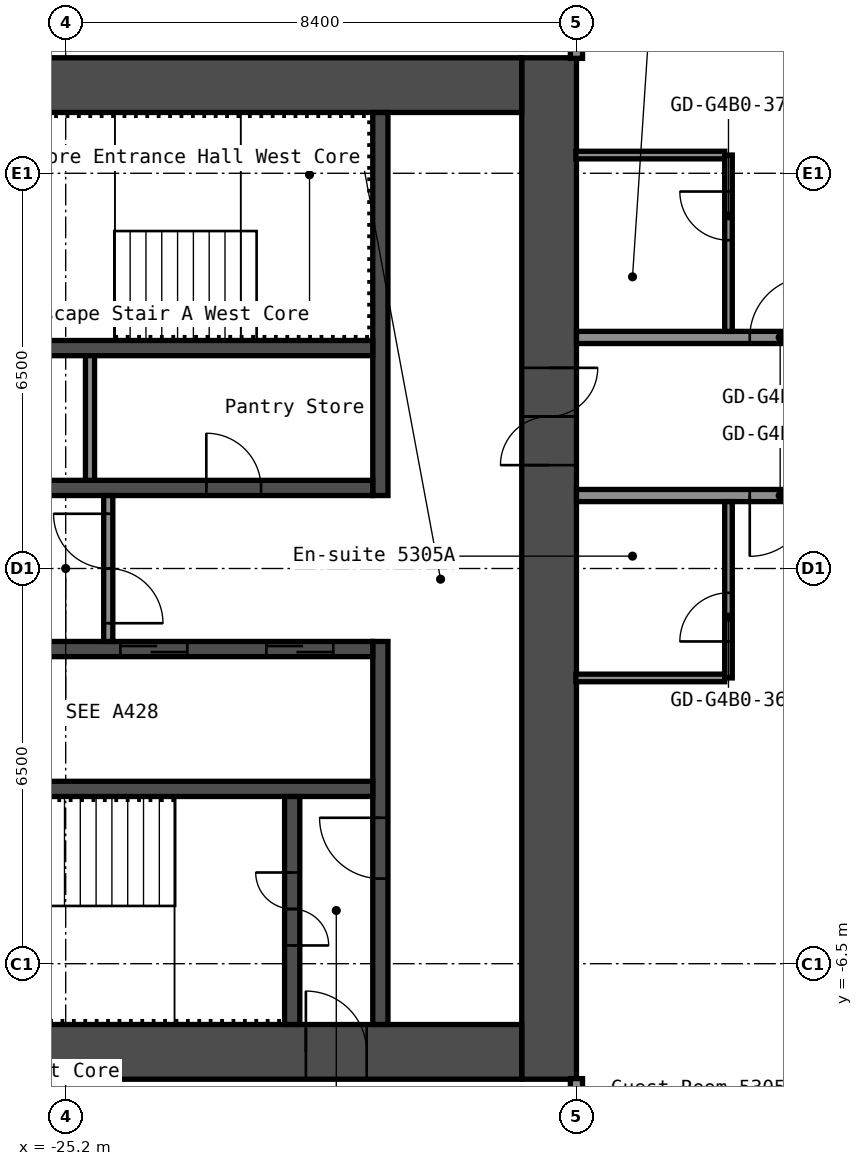
"""IFC4 building model, lengths in metres.
Left out: names, types, materials, properties, quantities, classifications, styles, units other than length and angle.
Written with IfcOpenShell. Run it as: python <this file> out.ifc"""

import sys

from ifc_helpers import new_model, si_unit, direction, frame, frame_2d, origin, place, context, subcontext, project, spatial, rectangle, extrude, element, fill, save


model = new_model("IFC4")
c1 = context("Model", 3, precision=1e-05, world=origin(), true_north=direction((0.0, 1.0)))
c2 = subcontext(c1, "Body", "Model", "MODEL_VIEW")
j1 = project(units=[si_unit("LENGTHUNIT", "METRE"), si_unit("PLANEANGLEUNIT", "RADIAN")], contexts=[c1])
p1 = place(None, origin())
s1 = spatial("IfcSite", under=j1, at=p1, CompositionType="ELEMENT")
p2 = place(p1, origin())
s2 = spatial("IfcBuilding", under=s1, at=p2, CompositionType="ELEMENT")
p3 = place(p2, frame((0.0, 0.0, 189.8)))
s3 = spatial("IfcBuildingStorey", under=s2, at=p3, CompositionType="ELEMENT", Elevation=189.8)
p4 = place(p3, frame((-17.25, -8.4, 0.0), z_axis=(0.0, 0.0, 1.0), x_axis=(0.0, 1.0, 0.0)))
e1 = element("IfcWall", 1, at=p4, inside=s3, PredefinedType="SHEAR", context=c2, shape_type="SweptSolid", body=[
    extrude(rectangle(XDim=16.8, YDim=0.9, at=frame_2d((8.4, 0.0))), origin(), (0.0, 0.0, 1.0), 2.75),
])
p5 = place(p4, frame((10.1, 0.0, 0.0)))
e2 = element("IfcOpeningElement", 2, at=p5, cuts=e1, PredefinedType="OPENING", context=c2, shape_type="SweptSolid", body=[
    extrude(rectangle(XDim=1.6, YDim=2.1, at=frame_2d((0.8, 1.05))), frame((0.0, 0.46, 0.0), z_axis=(0.0, -1.0, 0.0), x_axis=(1.0, 0.0, 0.0)), (0.0, 0.0, 1.0), 0.92),
])
p6 = place(p3, frame((-32.7, 7.95, 0.0), z_axis=(0.0, 0.0, 1.0), x_axis=(1.0, 0.0, 0.0)))
e3 = element("IfcWall", 3, at=p6, inside=s3, PredefinedType="SHEAR", context=c2, shape_type="SweptSolid", body=[
    extrude(rectangle(XDim=15.0, YDim=0.9, at=frame_2d((7.5, 0.0))), origin(), (0.0, 0.0, 1.0), 2.75),
])
p7 = place(p6, frame((3.4, 0.0, 0.0)))
e4 = element("IfcOpeningElement", 4, at=p7, cuts=e3, PredefinedType="OPENING", context=c2, shape_type="SweptSolid", body=[
    extrude(rectangle(XDim=1.2, YDim=2.1, at=frame_2d((0.6, 1.05))), frame((0.0, 0.46, 0.0), z_axis=(0.0, -1.0, 0.0), x_axis=(1.0, 0.0, 0.0)), (0.0, 0.0, 1.0), 0.92),
])
p8 = place(p6, frame((0.75, 0.0, 0.0)))
e5 = element("IfcOpeningElement", 5, at=p8, cuts=e3, PredefinedType="OPENING", context=c2, shape_type="SweptSolid", body=[
    extrude(rectangle(XDim=0.9, YDim=2.1, at=frame_2d((0.45, 1.05))), frame((0.0, 0.46, 0.0), z_axis=(0.0, -1.0, 0.0), x_axis=(1.0, 0.0, 0.0)), (0.0, 0.0, 1.0), 0.92),
])
p9 = place(p3, frame((-32.7, -7.95, 0.0), z_axis=(0.0, 0.0, 1.0), x_axis=(1.0, 0.0, 0.0)))
e6 = element("IfcWall", 6, at=p9, inside=s3, PredefinedType="SHEAR", context=c2, shape_type="SweptSolid", body=[
    extrude(rectangle(XDim=15.0, YDim=0.9, at=frame_2d((7.5, 0.0))), origin(), (0.0, 0.0, 1.0), 2.75),
])
p10 = place(p9, frame((11.45, 0.0, 0.0)))
e7 = element("IfcOpeningElement", 7, at=p10, cuts=e6, PredefinedType="OPENING", context=c2, shape_type="SweptSolid", body=[
    extrude(rectangle(XDim=1.0, YDim=2.1, at=frame_2d((0.5, 1.05))), frame((0.0, 0.46, 0.0), z_axis=(0.0, -1.0, 0.0), x_axis=(1.0, 0.0, 0.0)), (0.0, 0.0, 1.0), 0.92),
])
p11 = place(p3, frame((-20.025, 1.2, 0.0), z_axis=(0.0, 0.0, 1.0), x_axis=(0.0, 1.0, 0.0)))
e8 = element("IfcWall", 8, at=p11, inside=s3, PredefinedType="SHEAR", context=c2, shape_type="SweptSolid", body=[
    extrude(rectangle(XDim=6.3, YDim=0.25, at=frame_2d((3.15, 0.0))), origin(), (0.0, 0.0, 1.0), 2.75),
])
p12 = place(p3, frame((-20.025, -7.5, 0.0), z_axis=(0.0, 0.0, 1.0), x_axis=(0.0, 1.0, 0.0)))
e9 = element("IfcWall", 9, at=p12, inside=s3, PredefinedType="SHEAR", context=c2, shape_type="SweptSolid", body=[
    extrude(rectangle(XDim=6.3, YDim=0.25, at=frame_2d((3.15, 0.0))), origin(), (0.0, 0.0, 1.0), 2.75),
])
p13 = place(p12, frame((2.4, 0.0, 0.0)))
e10 = element("IfcOpeningElement", 10, at=p13, cuts=e9, PredefinedType="OPENING", context=c2, shape_type="SweptSolid", body=[
    extrude(rectangle(XDim=1.0, YDim=2.1, at=frame_2d((0.5, 1.05))), frame((0.0, 0.135, 0.0), z_axis=(0.0, -1.0, 0.0), x_axis=(1.0, 0.0, 0.0)), (0.0, 0.0, 1.0), 0.27),
])
p14 = place(p3, frame((-27.65, 1.325, 0.0), z_axis=(0.0, 0.0, 1.0), x_axis=(1.0, 0.0, 0.0)))
e11 = element("IfcWall", 11, at=p14, inside=s3, PredefinedType="SHEAR", context=c2, shape_type="SweptSolid", body=[
    extrude(rectangle(XDim=7.5, YDim=0.25, at=frame_2d((3.75, 0.0))), origin(), (0.0, 0.0, 1.0), 2.75),
])
p15 = place(p14, frame((4.762, 0.0, 0.0)))
e12 = element("IfcOpeningElement", 12, at=p15, cuts=e11, PredefinedType="OPENING", context=c2, shape_type="SweptSolid", body=[
    extrude(rectangle(XDim=0.9, YDim=2.1, at=frame_2d((0.45, 1.05))), frame((0.0, 0.135, 0.0), z_axis=(0.0, -1.0, 0.0), x_axis=(1.0, 0.0, 0.0)), (0.0, 0.0, 1.0), 0.27),
])
p16 = place(p14, frame((1.062, 0.0, 0.0)))
e13 = element("IfcOpeningElement", 13, at=p16, cuts=e11, PredefinedType="OPENING", context=c2, shape_type="SweptSolid", body=[
    extrude(rectangle(XDim=0.9, YDim=2.1, at=frame_2d((0.45, 1.05))), frame((0.0, 0.135, 0.0), z_axis=(0.0, -1.0, 0.0), x_axis=(1.0, 0.0, 0.0)), (0.0, 0.0, 1.0), 0.27),
])
p17 = place(p3, frame((-27.65, 3.625, 0.0), z_axis=(0.0, 0.0, 1.0), x_axis=(1.0, 0.0, 0.0)))
e14 = element("IfcWall", 14, at=p17, inside=s3, PredefinedType="SHEAR", context=c2, shape_type="SweptSolid", body=[
    extrude(rectangle(XDim=7.5, YDim=0.25, at=frame_2d((3.75, 0.0))), origin(), (0.0, 0.0, 1.0), 2.75),
])
p18 = place(p3, frame((-27.65, -1.325, 0.0), z_axis=(0.0, 0.0, 1.0), x_axis=(1.0, 0.0, 0.0)))
e15 = element("IfcWall", 15, at=p18, inside=s3, PredefinedType="SHEAR", context=c2, shape_type="SweptSolid", body=[
    extrude(rectangle(XDim=7.5, YDim=0.25, at=frame_2d((3.75, 0.0))), origin(), (0.0, 0.0, 1.0), 2.75),
])
p19 = place(p18, frame((5.75, 0.0, 0.0)))
e16 = element("IfcOpeningElement", 16, at=p19, cuts=e15, PredefinedType="OPENING", context=c2, shape_type="SweptSolid", body=[
    extrude(rectangle(XDim=1.1, YDim=2.1, at=frame_2d((0.55, 1.05))), frame((0.0, 0.135, 0.0), z_axis=(0.0, -1.0, 0.0), x_axis=(1.0, 0.0, 0.0)), (0.0, 0.0, 1.0), 0.27),
])
p20 = place(p18, frame((3.35, 0.0, 0.0)))
e17 = element("IfcOpeningElement", 17, at=p20, cuts=e15, PredefinedType="OPENING", context=c2, shape_type="SweptSolid", body=[
    extrude(rectangle(XDim=1.1, YDim=2.1, at=frame_2d((0.55, 1.05))), frame((0.0, 0.135, 0.0), z_axis=(0.0, -1.0, 0.0), x_axis=(1.0, 0.0, 0.0)), (0.0, 0.0, 1.0), 0.27),
])
p21 = place(p18, frame((0.95, 0.0, 0.0)))
e18 = element("IfcOpeningElement", 18, at=p21, cuts=e15, PredefinedType="OPENING", context=c2, shape_type="SweptSolid", body=[
    extrude(rectangle(XDim=1.1, YDim=2.1, at=frame_2d((0.55, 1.05))), frame((0.0, 0.135, 0.0), z_axis=(0.0, -1.0, 0.0), x_axis=(1.0, 0.0, 0.0)), (0.0, 0.0, 1.0), 0.27),
])
p22 = place(p3, frame((-27.65, -3.625, 0.0), z_axis=(0.0, 0.0, 1.0), x_axis=(1.0, 0.0, 0.0)))
e19 = element("IfcWall", 19, at=p22, inside=s3, PredefinedType="SHEAR", context=c2, shape_type="SweptSolid", body=[
    extrude(rectangle(XDim=7.5, YDim=0.25, at=frame_2d((3.75, 0.0))), origin(), (0.0, 0.0, 1.0), 2.75),
])
p23 = place(p3, frame((-21.475, -7.5, 0.0), z_axis=(0.0, 0.0, 1.0), x_axis=(0.0, 1.0, 0.0)))
e20 = element("IfcWall", 20, at=p23, inside=s3, PredefinedType="SHEAR", context=c2, shape_type="SweptSolid", body=[
    extrude(rectangle(XDim=3.75, YDim=0.25, at=frame_2d((1.875, 0.0))), origin(), (0.0, 0.0, 1.0), 2.75),
])
p24 = place(p23, frame((1.3, 0.0, 0.0)))
e21 = element("IfcOpeningElement", 21, at=p24, cuts=e20, PredefinedType="OPENING", context=c2, shape_type="SweptSolid", body=[
    extrude(rectangle(XDim=1.2, YDim=2.1, at=frame_2d((0.6, 1.05))), frame((0.0, 0.135, 0.0), z_axis=(0.0, -1.0, 0.0), x_axis=(1.0, 0.0, 0.0)), (0.0, 0.0, 1.0), 0.27),
])
p25 = place(p3, frame((-24.5, -1.2, 0.0), z_axis=(0.0, 0.0, 1.0), x_axis=(0.0, 1.0, 0.0)))
e22 = element("IfcWall", 22, at=p25, inside=s3, PredefinedType="PARTITIONING", context=c2, shape_type="SweptSolid", body=[
    extrude(rectangle(XDim=2.4, YDim=0.15, at=frame_2d((1.2, 0.0))), origin(), (0.0, 0.0, 1.0), 2.75),
])
p26 = place(p25, frame((0.3, 0.0, 0.0)))
e23 = element("IfcOpeningElement", 23, at=p26, cuts=e22, PredefinedType="OPENING", context=c2, shape_type="SweptSolid", body=[
    extrude(rectangle(XDim=1.8, YDim=2.1, at=frame_2d((0.9, 1.05))), frame((0.0, 0.085, 0.0), z_axis=(0.0, -1.0, 0.0), x_axis=(1.0, 0.0, 0.0)), (0.0, 0.0, 1.0), 0.17),
])
p27 = place(p3, frame((-24.8, 1.45, 0.0), z_axis=(0.0, 0.0, 1.0), x_axis=(0.0, 1.0, 0.0)))
e24 = element("IfcWall", 24, at=p27, inside=s3, PredefinedType="PARTITIONING", context=c2, shape_type="SweptSolid", body=[
    extrude(rectangle(XDim=2.05, YDim=0.15, at=frame_2d((1.025, 0.0))), origin(), (0.0, 0.0, 1.0), 2.75),
])
p28 = place(p3, frame((-16.81, -1.8, 0.0), z_axis=(0.0, 0.0, 1.0), x_axis=(1.0, 0.0, 0.0)))
e25 = element("IfcWall", 25, at=p28, inside=s3, PredefinedType="PARTITIONING", context=c2, shape_type="SweptSolid", body=[
    extrude(rectangle(XDim=2.448, YDim=0.125, at=frame_2d((1.224, 0.0))), origin(), (0.0, 0.0, 1.0), 2.75),
])
p29 = place(p3, frame((-16.8, 1.2, 0.0), z_axis=(0.0, 0.0, 1.0), x_axis=(1.0, 0.0, 0.0)))
e26 = element("IfcWall", 26, at=p29, inside=s3, PredefinedType="PARTITIONING", context=c2, shape_type="SweptSolid", body=[
    extrude(rectangle(XDim=33.6, YDim=0.2, at=frame_2d((16.8, 0.0))), origin(), (0.0, 0.0, 1.0), 2.75),
])
p30 = place(p29, frame((2.85, 0.0, 0.0)))
e27 = element("IfcOpeningElement", 27, at=p30, cuts=e26, PredefinedType="OPENING", context=c2, shape_type="SweptSolid", body=[
    extrude(rectangle(XDim=1.0, YDim=2.1, at=frame_2d((0.5, 1.05))), frame((0.0, 0.11, 0.0), z_axis=(0.0, -1.0, 0.0), x_axis=(1.0, 0.0, 0.0)), (0.0, 0.0, 1.0), 0.22),
])
p31 = place(p29, frame((4.55, 0.0, 0.0)))
e28 = element("IfcOpeningElement", 28, at=p31, cuts=e26, PredefinedType="OPENING", context=c2, shape_type="SweptSolid", body=[
    extrude(rectangle(XDim=1.0, YDim=2.1, at=frame_2d((0.5, 1.05))), frame((0.0, 0.11, 0.0), z_axis=(0.0, -1.0, 0.0), x_axis=(1.0, 0.0, 0.0)), (0.0, 0.0, 1.0), 0.22),
])
p32 = place(p29, frame((11.25, 0.0, 0.0)))
e29 = element("IfcOpeningElement", 29, at=p32, cuts=e26, PredefinedType="OPENING", context=c2, shape_type="SweptSolid", body=[
    extrude(rectangle(XDim=1.0, YDim=2.1, at=frame_2d((0.5, 1.05))), frame((0.0, 0.11, 0.0), z_axis=(0.0, -1.0, 0.0), x_axis=(1.0, 0.0, 0.0)), (0.0, 0.0, 1.0), 0.22),
])
p33 = place(p29, frame((12.95, 0.0, 0.0)))
e30 = element("IfcOpeningElement", 30, at=p33, cuts=e26, PredefinedType="OPENING", context=c2, shape_type="SweptSolid", body=[
    extrude(rectangle(XDim=1.0, YDim=2.1, at=frame_2d((0.5, 1.05))), frame((0.0, 0.11, 0.0), z_axis=(0.0, -1.0, 0.0), x_axis=(1.0, 0.0, 0.0)), (0.0, 0.0, 1.0), 0.22),
])
p34 = place(p29, frame((18.62, 0.0, 0.0)))
e31 = element("IfcOpeningElement", 31, at=p34, cuts=e26, PredefinedType="OPENING", context=c2, shape_type="SweptSolid", body=[
    extrude(rectangle(XDim=0.9, YDim=2.1, at=frame_2d((0.45, 1.05))), frame((0.0, 0.11, 0.0), z_axis=(0.0, -1.0, 0.0), x_axis=(1.0, 0.0, 0.0)), (0.0, 0.0, 1.0), 0.22),
])
p35 = place(p29, frame((22.82, 0.0, 0.0)))
e32 = element("IfcOpeningElement", 32, at=p35, cuts=e26, PredefinedType="OPENING", context=c2, shape_type="SweptSolid", body=[
    extrude(rectangle(XDim=0.9, YDim=2.1, at=frame_2d((0.45, 1.05))), frame((0.0, 0.11, 0.0), z_axis=(0.0, -1.0, 0.0), x_axis=(1.0, 0.0, 0.0)), (0.0, 0.0, 1.0), 0.22),
])
p36 = place(p29, frame((28.05, 0.0, 0.0)))
e33 = element("IfcOpeningElement", 33, at=p36, cuts=e26, PredefinedType="OPENING", context=c2, shape_type="SweptSolid", body=[
    extrude(rectangle(XDim=1.0, YDim=2.1, at=frame_2d((0.5, 1.05))), frame((0.0, 0.11, 0.0), z_axis=(0.0, -1.0, 0.0), x_axis=(1.0, 0.0, 0.0)), (0.0, 0.0, 1.0), 0.22),
])
p37 = place(p29, frame((29.75, 0.0, 0.0)))
e34 = element("IfcOpeningElement", 34, at=p37, cuts=e26, PredefinedType="OPENING", context=c2, shape_type="SweptSolid", body=[
    extrude(rectangle(XDim=1.0, YDim=2.1, at=frame_2d((0.5, 1.05))), frame((0.0, 0.11, 0.0), z_axis=(0.0, -1.0, 0.0), x_axis=(1.0, 0.0, 0.0)), (0.0, 0.0, 1.0), 0.22),
])
p38 = place(p3, frame((-16.8, 3.8, 0.0), z_axis=(0.0, 0.0, 1.0), x_axis=(1.0, 0.0, 0.0)))
e35 = element("IfcWall", 35, at=p38, inside=s3, PredefinedType="PARTITIONING", context=c2, shape_type="SweptSolid", body=[
    extrude(rectangle(XDim=33.6, YDim=0.2, at=frame_2d((16.8, 0.0))), origin(), (0.0, 0.0, 1.0), 2.75),
])
p39 = place(p38, frame((2.85, 0.0, 0.0)))
e36 = element("IfcOpeningElement", 36, at=p39, cuts=e35, PredefinedType="OPENING", context=c2, shape_type="SweptSolid", body=[
    extrude(rectangle(XDim=1.0, YDim=2.1, at=frame_2d((0.5, 1.05))), frame((0.0, 0.11, 0.0), z_axis=(0.0, -1.0, 0.0), x_axis=(1.0, 0.0, 0.0)), (0.0, 0.0, 1.0), 0.22),
])
p40 = place(p38, frame((4.55, 0.0, 0.0)))
e37 = element("IfcOpeningElement", 37, at=p40, cuts=e35, PredefinedType="OPENING", context=c2, shape_type="SweptSolid", body=[
    extrude(rectangle(XDim=1.0, YDim=2.1, at=frame_2d((0.5, 1.05))), frame((0.0, 0.11, 0.0), z_axis=(0.0, -1.0, 0.0), x_axis=(1.0, 0.0, 0.0)), (0.0, 0.0, 1.0), 0.22),
])
p41 = place(p38, frame((12.1, 0.0, 0.0)))
e38 = element("IfcOpeningElement", 38, at=p41, cuts=e35, PredefinedType="OPENING", context=c2, shape_type="SweptSolid", body=[
    extrude(rectangle(XDim=1.0, YDim=2.1, at=frame_2d((0.5, 1.05))), frame((0.0, 0.11, 0.0), z_axis=(0.0, -1.0, 0.0), x_axis=(1.0, 0.0, 0.0)), (0.0, 0.0, 1.0), 0.22),
])
p42 = place(p38, frame((19.65, 0.0, 0.0)))
e39 = element("IfcOpeningElement", 39, at=p42, cuts=e35, PredefinedType="OPENING", context=c2, shape_type="SweptSolid", body=[
    extrude(rectangle(XDim=1.0, YDim=2.1, at=frame_2d((0.5, 1.05))), frame((0.0, 0.11, 0.0), z_axis=(0.0, -1.0, 0.0), x_axis=(1.0, 0.0, 0.0)), (0.0, 0.0, 1.0), 0.22),
])
p43 = place(p38, frame((21.35, 0.0, 0.0)))
e40 = element("IfcOpeningElement", 40, at=p43, cuts=e35, PredefinedType="OPENING", context=c2, shape_type="SweptSolid", body=[
    extrude(rectangle(XDim=1.0, YDim=2.1, at=frame_2d((0.5, 1.05))), frame((0.0, 0.11, 0.0), z_axis=(0.0, -1.0, 0.0), x_axis=(1.0, 0.0, 0.0)), (0.0, 0.0, 1.0), 0.22),
])
p44 = place(p38, frame((28.05, 0.0, 0.0)))
e41 = element("IfcOpeningElement", 41, at=p44, cuts=e35, PredefinedType="OPENING", context=c2, shape_type="SweptSolid", body=[
    extrude(rectangle(XDim=1.0, YDim=2.1, at=frame_2d((0.5, 1.05))), frame((0.0, 0.11, 0.0), z_axis=(0.0, -1.0, 0.0), x_axis=(1.0, 0.0, 0.0)), (0.0, 0.0, 1.0), 0.22),
])
p45 = place(p38, frame((29.75, 0.0, 0.0)))
e42 = element("IfcOpeningElement", 42, at=p45, cuts=e35, PredefinedType="OPENING", context=c2, shape_type="SweptSolid", body=[
    extrude(rectangle(XDim=1.0, YDim=2.1, at=frame_2d((0.5, 1.05))), frame((0.0, 0.11, 0.0), z_axis=(0.0, -1.0, 0.0), x_axis=(1.0, 0.0, 0.0)), (0.0, 0.0, 1.0), 0.22),
])
p46 = place(p3, frame((-16.81, 6.8, 0.0), z_axis=(0.0, 0.0, 1.0), x_axis=(1.0, 0.0, 0.0)))
e43 = element("IfcWall", 43, at=p46, inside=s3, PredefinedType="PARTITIONING", context=c2, shape_type="SweptSolid", body=[
    extrude(rectangle(XDim=2.448, YDim=0.125, at=frame_2d((1.224, 0.0))), origin(), (0.0, 0.0, 1.0), 2.75),
])
p47 = place(p3, frame((-16.8, -15.55, 0.0), z_axis=(0.0, 0.0, 1.0), x_axis=(0.0, 1.0, 0.0)))
e44 = element("IfcWall", 44, at=p47, inside=s3, PredefinedType="PARTITIONING", context=c2, shape_type="SweptSolid", body=[
    extrude(rectangle(XDim=7.16, YDim=0.2, at=frame_2d((3.58, 0.0))), origin(), (0.0, 0.0, 1.0), 2.75),
])
p48 = place(p3, frame((-16.8, 8.39, 0.0), z_axis=(0.0, 0.0, 1.0), x_axis=(0.0, 1.0, 0.0)))
e45 = element("IfcWall", 45, at=p48, inside=s3, PredefinedType="PARTITIONING", context=c2, shape_type="SweptSolid", body=[
    extrude(rectangle(XDim=12.16, YDim=0.2, at=frame_2d((6.08, 0.0))), origin(), (0.0, 0.0, 1.0), 2.75),
])
p49 = place(p3, frame((-14.3, -1.8, 0.0), z_axis=(0.0, 0.0, 1.0), x_axis=(0.0, 1.0, 0.0)))
e46 = element("IfcWall", 46, at=p49, inside=s3, PredefinedType="PARTITIONING", context=c2, shape_type="SweptSolid", body=[
    extrude(rectangle(XDim=2.9, YDim=0.125, at=frame_2d((1.45, 0.0))), origin(), (0.0, 0.0, 1.0), 2.75),
])
p50 = place(p49, frame((0.6, 0.0, 0.0)))
e47 = element("IfcOpeningElement", 47, at=p50, cuts=e46, PredefinedType="OPENING", context=c2, shape_type="SweptSolid", body=[
    extrude(rectangle(XDim=0.8, YDim=2.1, at=frame_2d((0.4, 1.05))), frame((0.0, 0.073, 0.0), z_axis=(0.0, -1.0, 0.0), x_axis=(1.0, 0.0, 0.0)), (0.0, 0.0, 1.0), 0.145),
])
p51 = place(p3, frame((-14.3, 3.9, 0.0), z_axis=(0.0, 0.0, 1.0), x_axis=(0.0, 1.0, 0.0)))
e48 = element("IfcWall", 48, at=p51, inside=s3, PredefinedType="PARTITIONING", context=c2, shape_type="SweptSolid", body=[
    extrude(rectangle(XDim=2.9, YDim=0.125, at=frame_2d((1.45, 0.0))), origin(), (0.0, 0.0, 1.0), 2.75),
])
p52 = place(p51, frame((1.5, 0.0, 0.0)))
e49 = element("IfcOpeningElement", 49, at=p52, cuts=e48, PredefinedType="OPENING", context=c2, shape_type="SweptSolid", body=[
    extrude(rectangle(XDim=0.8, YDim=2.1, at=frame_2d((0.4, 1.05))), frame((0.0, 0.073, 0.0), z_axis=(0.0, -1.0, 0.0), x_axis=(1.0, 0.0, 0.0)), (0.0, 0.0, 1.0), 0.145),
])
p53 = place(p5, origin())
e50 = element("IfcDoor", 50, at=p53, inside=s3, OperationType="DOUBLE_DOOR_SINGLE_SWING", PredefinedType="DOOR", context=c2, shape_type="SweptSolid", body=[
    extrude(rectangle(XDim=1.6, YDim=2.1, at=frame_2d((0.8, 1.05))), frame((0.0, 0.025, 0.0), z_axis=(0.0, -1.0, 0.0), x_axis=(1.0, 0.0, 0.0)), (0.0, 0.0, 1.0), 0.05),
])
fill(e2, e50)
p54 = place(p10, origin())
e51 = element("IfcDoor", 51, at=p54, inside=s3, OperationType="SINGLE_SWING_RIGHT", PredefinedType="DOOR", context=c2, shape_type="SweptSolid", body=[
    extrude(rectangle(XDim=1.0, YDim=2.1, at=frame_2d((0.5, 1.05))), frame((0.0, 0.025, 0.0), z_axis=(0.0, -1.0, 0.0), x_axis=(1.0, 0.0, 0.0)), (0.0, 0.0, 1.0), 0.05),
])
fill(e7, e51)
p55 = place(p24, origin())
e52 = element("IfcDoor", 52, at=p55, inside=s3, OperationType="DOUBLE_DOOR_SINGLE_SWING", PredefinedType="DOOR", context=c2, shape_type="SweptSolid", body=[
    extrude(rectangle(XDim=1.2, YDim=2.1, at=frame_2d((0.6, 1.05))), frame((0.0, 0.025, 0.0), z_axis=(0.0, -1.0, 0.0), x_axis=(1.0, 0.0, 0.0)), (0.0, 0.0, 1.0), 0.05),
])
fill(e21, e52)
p56 = place(p13, origin())
e53 = element("IfcDoor", 53, at=p56, inside=s3, OperationType="SINGLE_SWING_LEFT", PredefinedType="DOOR", context=c2, shape_type="SweptSolid", body=[
    extrude(rectangle(XDim=1.0, YDim=2.1, at=frame_2d((0.5, 1.05))), frame((0.0, 0.025, 0.0), z_axis=(0.0, -1.0, 0.0), x_axis=(1.0, 0.0, 0.0)), (0.0, 0.0, 1.0), 0.05),
])
fill(e10, e53)
p57 = place(p26, origin())
e54 = element("IfcDoor", 54, at=p57, inside=s3, OperationType="DOUBLE_DOOR_SINGLE_SWING", PredefinedType="DOOR", context=c2, shape_type="SweptSolid", body=[
    extrude(rectangle(XDim=1.8, YDim=2.1, at=frame_2d((0.9, 1.05))), frame((0.0, 0.025, 0.0), z_axis=(0.0, -1.0, 0.0), x_axis=(1.0, 0.0, 0.0)), (0.0, 0.0, 1.0), 0.05),
])
fill(e23, e54)
p58 = place(p15, origin())
e55 = element("IfcDoor", 55, at=p58, inside=s3, OperationType="SINGLE_SWING_RIGHT", PredefinedType="DOOR", context=c2, shape_type="SweptSolid", body=[
    extrude(rectangle(XDim=0.9, YDim=2.1, at=frame_2d((0.45, 1.05))), frame((0.0, 0.025, 0.0), z_axis=(0.0, -1.0, 0.0), x_axis=(1.0, 0.0, 0.0)), (0.0, 0.0, 1.0), 0.05),
])
fill(e12, e55)
p59 = place(p19, origin())
e56 = element("IfcDoor", 56, at=p59, inside=s3, OperationType="DOUBLE_DOOR_SLIDING", PredefinedType="DOOR", context=c2, shape_type="SweptSolid", body=[
    extrude(rectangle(XDim=1.1, YDim=2.1, at=frame_2d((0.55, 1.05))), frame((0.0, 0.025, 0.0), z_axis=(0.0, -1.0, 0.0), x_axis=(1.0, 0.0, 0.0)), (0.0, 0.0, 1.0), 0.05),
])
fill(e16, e56)
p60 = place(p20, origin())
e57 = element("IfcDoor", 57, at=p60, inside=s3, OperationType="DOUBLE_DOOR_SLIDING", PredefinedType="DOOR", context=c2, shape_type="SweptSolid", body=[
    extrude(rectangle(XDim=1.1, YDim=2.1, at=frame_2d((0.55, 1.05))), frame((0.0, 0.025, 0.0), z_axis=(0.0, -1.0, 0.0), x_axis=(1.0, 0.0, 0.0)), (0.0, 0.0, 1.0), 0.05),
])
fill(e17, e57)
p61 = place(p30, origin())
e58 = element("IfcDoor", 58, at=p61, inside=s3, OperationType="SINGLE_SWING_LEFT", PredefinedType="DOOR", context=c2, shape_type="SweptSolid", body=[
    extrude(rectangle(XDim=1.0, YDim=2.1, at=frame_2d((0.5, 1.05))), frame((0.0, 0.025, 0.0), z_axis=(0.0, -1.0, 0.0), x_axis=(1.0, 0.0, 0.0)), (0.0, 0.0, 1.0), 0.05),
])
fill(e27, e58)
p62 = place(p39, origin())
e59 = element("IfcDoor", 59, at=p62, inside=s3, OperationType="SINGLE_SWING_LEFT", PredefinedType="DOOR", context=c2, shape_type="SweptSolid", body=[
    extrude(rectangle(XDim=1.0, YDim=2.1, at=frame_2d((0.5, 1.05))), frame((0.0, 0.025, 0.0), z_axis=(0.0, -1.0, 0.0), x_axis=(1.0, 0.0, 0.0)), (0.0, 0.0, 1.0), 0.05),
])
fill(e36, e59)
p63 = place(p50, origin())
e60 = element("IfcDoor", 60, at=p63, inside=s3, OperationType="SINGLE_SWING_RIGHT", PredefinedType="DOOR", context=c2, shape_type="SweptSolid", body=[
    extrude(rectangle(XDim=0.8, YDim=2.1, at=frame_2d((0.4, 1.05))), frame((0.0, 0.025, 0.0), z_axis=(0.0, -1.0, 0.0), x_axis=(1.0, 0.0, 0.0)), (0.0, 0.0, 1.0), 0.05),
])
fill(e47, e60)
p64 = place(p52, origin())
e61 = element("IfcDoor", 61, at=p64, inside=s3, OperationType="SINGLE_SWING_LEFT", PredefinedType="DOOR", context=c2, shape_type="SweptSolid", body=[
    extrude(rectangle(XDim=0.8, YDim=2.1, at=frame_2d((0.4, 1.05))), frame((0.0, 0.025, 0.0), z_axis=(0.0, -1.0, 0.0), x_axis=(1.0, 0.0, 0.0)), (0.0, 0.0, 1.0), 0.05),
])
fill(e49, e61)
save(model, sys.argv[1])
